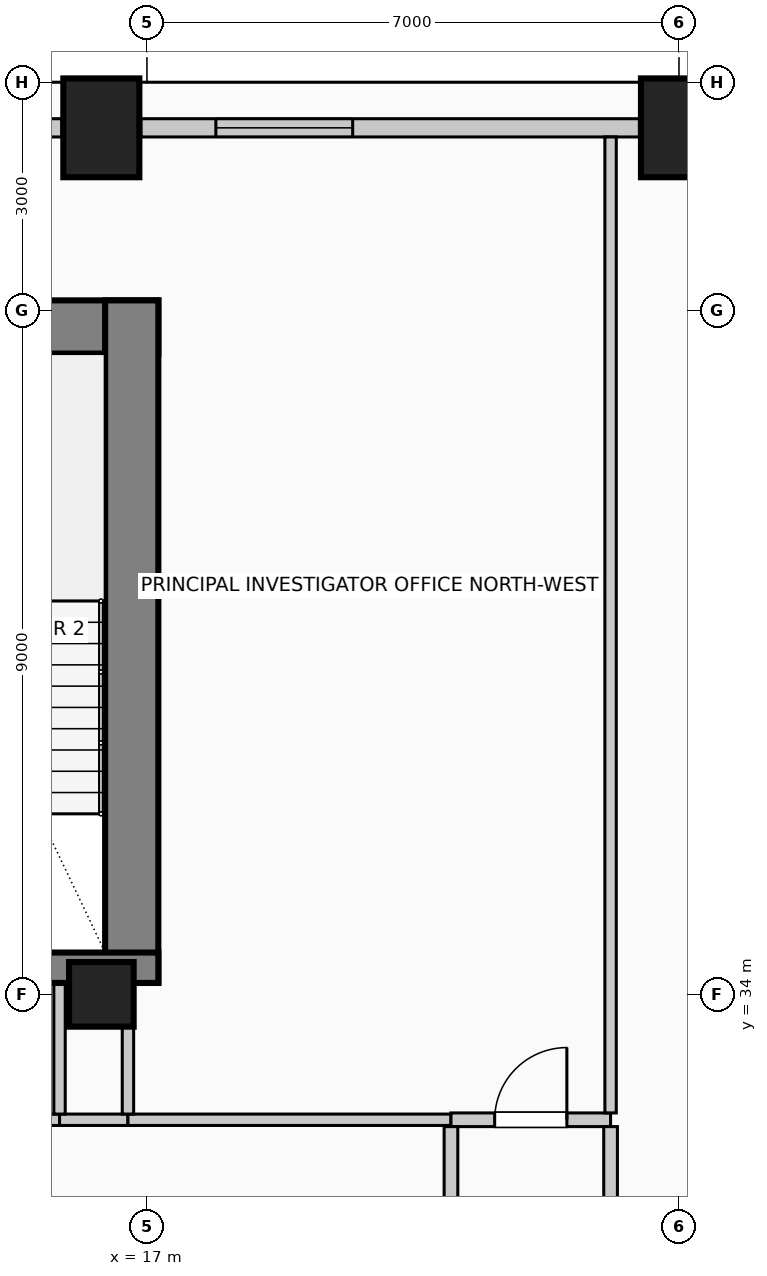
"""IFC4 building model, lengths in metres.
Left out: names, types, materials, properties, quantities, classifications, styles, units other than length and angle.
Written with IfcOpenShell. Run it as: python <this file> out.ifc"""

import sys

from ifc_helpers import new_model, si_unit, direction, frame, frame_2d, origin, origin_2d, place, context, subcontext, project, spatial, rectangle, circle, extrude, element, fill, save


model = new_model("IFC4")
c1 = context("Model", 3, precision=1e-05, world=origin(), true_north=direction((0.0, 1.0)))
c2 = subcontext(c1, "Body", "Model", "MODEL_VIEW")
j1 = project(units=[si_unit("LENGTHUNIT", "METRE"), si_unit("PLANEANGLEUNIT", "RADIAN")], contexts=[c1])
p1 = place(None, origin())
s1 = spatial("IfcSite", under=j1, at=p1, CompositionType="ELEMENT")
p2 = place(p1, origin())
s2 = spatial("IfcBuilding", under=s1, at=p2, CompositionType="ELEMENT")
p3 = place(p2, frame((0.0, 0.0, 230.6)))
s3 = spatial("IfcBuildingStorey", under=s2, at=p3, CompositionType="ELEMENT", Elevation=230.6)
p4 = place(p3, frame((2.85, 42.78, 0.0), z_axis=(0.0, 0.0, 1.0), x_axis=(1.0, 0.0, 0.0)))
e1 = element("IfcWall", 1, at=p4, inside=s3, PredefinedType="SHEAR", context=c2, shape_type="SweptSolid", body=[
    extrude(rectangle(XDim=14.3, YDim=0.7, at=frame_2d((7.15, 0.0))), origin(), (0.0, 0.0, 1.0), 4.0),
])
p5 = place(p3, frame((16.8, 34.15, 0.0), z_axis=(0.0, 0.0, 1.0), x_axis=(0.0, 1.0, 0.0)))
e2 = element("IfcWall", 2, at=p5, inside=s3, PredefinedType="SHEAR", context=c2, shape_type="SweptSolid", body=[
    extrude(rectangle(XDim=8.98, YDim=0.7, at=frame_2d((4.49, 0.0))), origin(), (0.0, 0.0, 1.0), 4.0),
])
p6 = place(p3, frame((12.29, 34.35, 0.0), z_axis=(0.0, 0.0, 1.0), x_axis=(1.0, 0.0, 0.0)))
e3 = element("IfcWall", 3, at=p6, inside=s3, PredefinedType="SHEAR", context=c2, shape_type="SweptSolid", body=[
    extrude(rectangle(XDim=4.86, YDim=0.4, at=frame_2d((2.43, 0.0))), origin(), (0.0, 0.0, 1.0), 4.0),
])
p7 = place(p6, frame((1.4, 0.0, 0.0)))
e4 = element("IfcOpeningElement", 4, at=p7, cuts=e3, PredefinedType="OPENING", context=c2, shape_type="SweptSolid", body=[
    extrude(rectangle(XDim=1.15, YDim=2.2, at=frame_2d((0.575, 1.1))), frame((0.0, 0.21, 0.0), z_axis=(0.0, -1.0, 0.0), x_axis=(1.0, 0.0, 0.0)), (0.0, 0.0, 1.0), 0.42),
])
for number, where, z_axis, x_axis in (
    (5, (16.4, 45.4, 0.0), (0.0, 0.0, 1.0), (1.0, 0.0, 0.0)),
    (6, (24.0, 45.4, 0.0), (0.0, 0.0, 1.0), (1.0, 0.0, 0.0)),
):
    element("IfcColumn", number, at=place(p3, frame(where, z_axis=z_axis, x_axis=x_axis)), inside=s3, PredefinedType="COLUMN", context=c2, shape_type="SweptSolid", body=[
        extrude(rectangle(XDim=1.0, YDim=1.3, at=origin_2d()), origin(), (0.0, 0.0, 1.0), 4.0),
    ])
p8 = place(p3, frame((16.4, 34.0, 0.0), z_axis=(0.0, 0.0, 1.0), x_axis=(1.0, 0.0, 0.0)))
e7 = element("IfcColumn", 7, at=p8, inside=s3, PredefinedType="COLUMN", context=c2, shape_type="SweptSolid", body=[
    extrude(circle(Radius=0.425, at=origin_2d()), origin(), (0.0, 0.0, 1.0), 4.0),
])
p9 = place(p3, frame((14.395, 45.4, 0.0), z_axis=(0.0, 0.0, 1.0), x_axis=(1.0, 0.0, 0.0)))
e8 = element("IfcWall", 8, at=p9, inside=s3, PredefinedType="SOLIDWALL", context=c2, shape_type="SweptSolid", body=[
    extrude(rectangle(XDim=1.485, YDim=0.24, at=frame_2d((0.742, 0.0))), origin(), (0.0, 0.0, 1.0), 3.0),
])
p10 = place(p3, frame((16.92, 45.4, 0.0), z_axis=(0.0, 0.0, 1.0), x_axis=(1.0, 0.0, 0.0)))
e9 = element("IfcWall", 9, at=p10, inside=s3, PredefinedType="SOLIDWALL", context=c2, shape_type="SweptSolid", body=[
    extrude(rectangle(XDim=6.56, YDim=0.24, at=frame_2d((3.28, 0.0))), origin(), (0.0, 0.0, 1.0), 3.0),
])
p11 = place(p10, frame((0.987, 0.0, 0.42)))
e10 = element("IfcOpeningElement", 10, at=p11, cuts=e9, PredefinedType="OPENING", context=c2, shape_type="SweptSolid", body=[
    extrude(rectangle(XDim=1.8, YDim=2.2, at=frame_2d((0.9, 1.1))), frame((0.0, 0.13, 0.0), z_axis=(0.0, -1.0, 0.0), x_axis=(1.0, 0.0, 0.0)), (0.0, 0.0, 1.0), 0.26),
])
p12 = place(p3, frame((12.33, 32.35, 0.0), z_axis=(0.0, 0.0, 1.0), x_axis=(1.0, 0.0, 0.0)))
e11 = element("IfcWall", 11, at=p12, inside=s3, PredefinedType="PARTITIONING", context=c2, shape_type="SweptSolid", body=[
    extrude(rectangle(XDim=3.52, YDim=0.15, at=frame_2d((1.76, 0.0))), origin(), (0.0, 0.0, 1.0), 3.75),
])
p13 = place(p12, frame((1.235, 0.0, 0.0)))
e12 = element("IfcOpeningElement", 12, at=p13, cuts=e11, PredefinedType="OPENING", context=c2, shape_type="SweptSolid", body=[
    extrude(rectangle(XDim=1.05, YDim=2.15, at=frame_2d((0.525, 1.075))), frame((0.0, 0.085, 0.0), z_axis=(0.0, -1.0, 0.0), x_axis=(1.0, 0.0, 0.0)), (0.0, 0.0, 1.0), 0.17),
])
p14 = place(p3, frame((15.85, 32.35, 0.0), z_axis=(0.0, 0.0, 1.0), x_axis=(1.0, 0.0, 0.0)))
e13 = element("IfcWall", 13, at=p14, inside=s3, PredefinedType="PARTITIONING", context=c2, shape_type="SweptSolid", body=[
    extrude(rectangle(XDim=0.9, YDim=0.15, at=frame_2d((0.45, 0.0))), origin(), (0.0, 0.0, 1.0), 3.75),
])
p15 = place(p3, frame((16.75, 32.35, 0.0), z_axis=(0.0, 0.0, 1.0), x_axis=(1.0, 0.0, 0.0)))
e14 = element("IfcWall", 14, at=p15, inside=s3, PredefinedType="PARTITIONING", context=c2, shape_type="SweptSolid", body=[
    extrude(rectangle(XDim=4.25, YDim=0.15, at=frame_2d((2.125, 0.0))), origin(), (0.0, 0.0, 1.0), 3.75),
])
p16 = place(p3, frame((21.0, 32.35, 0.0), z_axis=(0.0, 0.0, 1.0), x_axis=(1.0, 0.0, 0.0)))
e15 = element("IfcWall", 15, at=p16, inside=s3, PredefinedType="PARTITIONING", context=c2, shape_type="SweptSolid", body=[
    extrude(rectangle(XDim=2.1, YDim=0.18, at=frame_2d((1.05, 0.0))), origin(), (0.0, 0.0, 1.0), 3.75),
])
p17 = place(p16, frame((0.575, 0.0, 0.0)))
e16 = element("IfcOpeningElement", 16, at=p17, cuts=e15, PredefinedType="OPENING", context=c2, shape_type="SweptSolid", body=[
    extrude(rectangle(XDim=0.95, YDim=2.15, at=frame_2d((0.475, 1.075))), frame((0.0, 0.1, 0.0), z_axis=(0.0, -1.0, 0.0), x_axis=(1.0, 0.0, 0.0)), (0.0, 0.0, 1.0), 0.2),
])
p18 = place(p3, frame((15.85, 32.425, 0.0), z_axis=(0.0, 0.0, 1.0), x_axis=(0.0, 1.0, 0.0)))
e17 = element("IfcWall", 17, at=p18, inside=s3, PredefinedType="PARTITIONING", context=c2, shape_type="SweptSolid", body=[
    extrude(rectangle(XDim=1.725, YDim=0.15, at=frame_2d((0.862, 0.0))), origin(), (0.0, 0.0, 1.0), 3.75),
])
p19 = place(p3, frame((16.75, 32.425, 0.0), z_axis=(0.0, 0.0, 1.0), x_axis=(0.0, 1.0, 0.0)))
e18 = element("IfcWall", 18, at=p19, inside=s3, PredefinedType="PARTITIONING", context=c2, shape_type="SweptSolid", body=[
    extrude(rectangle(XDim=1.15, YDim=0.15, at=frame_2d((0.575, 0.0))), origin(), (0.0, 0.0, 1.0), 3.75),
])
p20 = place(p3, frame((21.0, 26.925, 0.0), z_axis=(0.0, 0.0, 1.0), x_axis=(0.0, 1.0, 0.0)))
e19 = element("IfcWall", 19, at=p20, inside=s3, PredefinedType="PARTITIONING", context=c2, shape_type="SweptSolid", body=[
    extrude(rectangle(XDim=5.335, YDim=0.18, at=frame_2d((2.667, 0.0))), origin(), (0.0, 0.0, 1.0), 3.75),
])
p21 = place(p3, frame((23.1, 29.14, 0.0), z_axis=(0.0, 0.0, 1.0), x_axis=(0.0, 1.0, 0.0)))
e20 = element("IfcWall", 20, at=p21, inside=s3, PredefinedType="PARTITIONING", context=c2, shape_type="SweptSolid", body=[
    extrude(rectangle(XDim=3.12, YDim=0.18, at=frame_2d((1.56, 0.0))), origin(), (0.0, 0.0, 1.0), 3.75),
])
p22 = place(p3, frame((23.1, 32.44, 0.0), z_axis=(0.0, 0.0, 1.0), x_axis=(0.0, 1.0, 0.0)))
e21 = element("IfcWall", 21, at=p22, inside=s3, PredefinedType="PARTITIONING", context=c2, shape_type="SweptSolid", body=[
    extrude(rectangle(XDim=12.84, YDim=0.15, at=frame_2d((6.42, 0.0))), origin(), (0.0, 0.0, 1.0), 3.75),
])
p23 = place(p11, origin())
e22 = element("IfcWindow", 22, at=p23, inside=s3, PartitioningType="SINGLE_PANEL", PredefinedType="WINDOW", context=c2, shape_type="SweptSolid", body=[
    extrude(rectangle(XDim=1.8, YDim=2.2, at=frame_2d((0.9, 1.1))), frame((0.0, 0.03, 0.0), z_axis=(0.0, -1.0, 0.0), x_axis=(1.0, 0.0, 0.0)), (0.0, 0.0, 1.0), 0.06),
])
fill(e10, e22)
p24 = place(p17, origin())
e23 = element("IfcDoor", 23, at=p24, inside=s3, OperationType="SINGLE_SWING_RIGHT", PredefinedType="DOOR", context=c2, shape_type="SweptSolid", body=[
    extrude(rectangle(XDim=0.95, YDim=2.15, at=frame_2d((0.475, 1.075))), frame((0.0, 0.025, 0.0), z_axis=(0.0, -1.0, 0.0), x_axis=(1.0, 0.0, 0.0)), (0.0, 0.0, 1.0), 0.05),
])
fill(e16, e23)
save(model, sys.argv[1])
